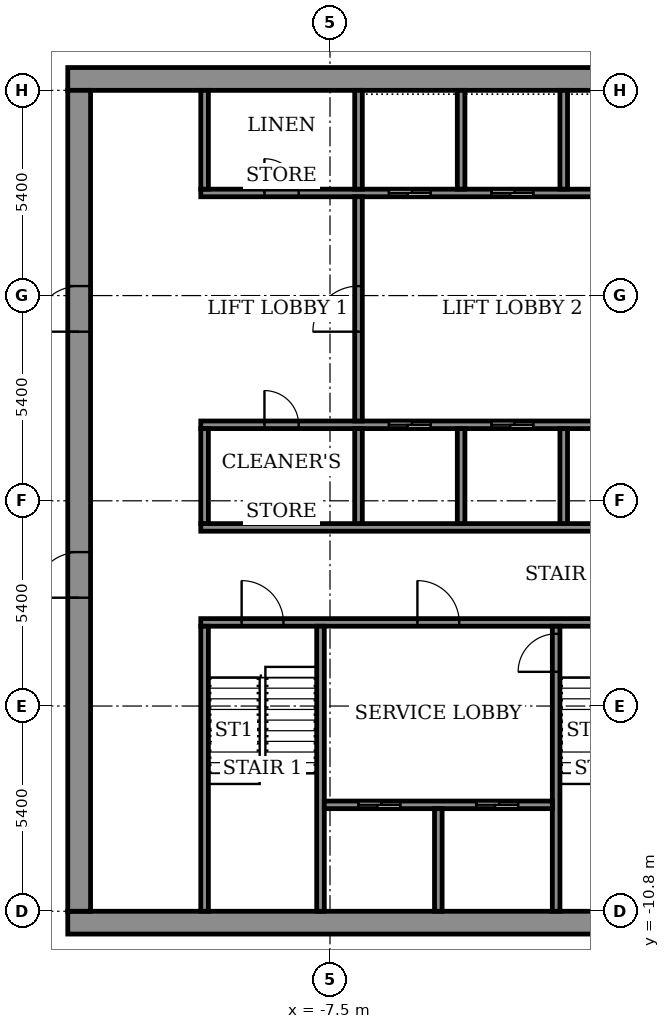
"""IFC4 building model, lengths in metres.
Left out: names, types, materials, properties, quantities, classifications, styles, units other than length and angle.
Written with IfcOpenShell. Run it as: python <this file> out.ifc"""

import sys

from ifc_helpers import new_model, si_unit, direction, frame, frame_2d, origin, place, context, subcontext, project, spatial, rectangle, extrude, element, fill, save


model = new_model("IFC4")
c1 = context("Model", 3, precision=1e-05, world=origin(), true_north=direction((0.0, 1.0)))
c2 = subcontext(c1, "Body", "Model", "MODEL_VIEW")
j1 = project(units=[si_unit("LENGTHUNIT", "METRE"), si_unit("PLANEANGLEUNIT", "RADIAN")], contexts=[c1])
p1 = place(None, origin())
s1 = spatial("IfcSite", under=j1, at=p1, CompositionType="ELEMENT")
p2 = place(p1, origin())
s2 = spatial("IfcBuilding", under=s1, at=p2, CompositionType="ELEMENT")
p3 = place(p2, frame((0.0, 0.0, 306.1)))
s3 = spatial("IfcBuildingStorey", under=s2, at=p3, CompositionType="ELEMENT", Elevation=306.1)
for number, where, z_axis, x_axis in (
    (1, (-14.4, -11.1, 0.0), (0.0, 0.0, 1.0), (1.0, 0.0, 0.0)),
    (2, (-14.4, 11.1, 0.0), (0.0, 0.0, 1.0), (1.0, 0.0, 0.0)),
):
    element("IfcWall", number, at=place(p3, frame(where, z_axis=z_axis, x_axis=x_axis)), inside=s3, PredefinedType="SHEAR", context=c2, shape_type="SweptSolid", body=[
        extrude(rectangle(XDim=28.8, YDim=0.6, at=frame_2d((14.4, 0.0))), origin(), (0.0, 0.0, 1.0), 3.6),
    ])
p4 = place(p3, frame((-14.1, -10.8, 0.0), z_axis=(0.0, 0.0, 1.0), x_axis=(0.0, 1.0, 0.0)))
e3 = element("IfcWall", 3, at=p4, inside=s3, PredefinedType="SHEAR", context=c2, shape_type="SweptSolid", body=[
    extrude(rectangle(XDim=21.6, YDim=0.6, at=frame_2d((10.8, 0.0))), origin(), (0.0, 0.0, 1.0), 3.6),
])
p5 = place(p4, frame((8.25, 0.0, 0.0)))
e4 = element("IfcOpeningElement", 4, at=p5, cuts=e3, PredefinedType="OPENING", context=c2, shape_type="SweptSolid", body=[
    extrude(rectangle(XDim=1.2, YDim=2.1, at=frame_2d((0.6, 1.05))), frame((0.0, 0.31, 0.0), z_axis=(0.0, -1.0, 0.0), x_axis=(1.0, 0.0, 0.0)), (0.0, 0.0, 1.0), 0.62),
])
p6 = place(p4, frame((15.25, 0.0, 0.0)))
e5 = element("IfcOpeningElement", 5, at=p6, cuts=e3, PredefinedType="OPENING", context=c2, shape_type="SweptSolid", body=[
    extrude(rectangle(XDim=1.2, YDim=2.1, at=frame_2d((0.6, 1.05))), frame((0.0, 0.31, 0.0), z_axis=(0.0, -1.0, 0.0), x_axis=(1.0, 0.0, 0.0)), (0.0, 0.0, 1.0), 0.62),
])
p7 = place(p3, frame((-10.9, -3.2, 0.0), z_axis=(0.0, 0.0, 1.0), x_axis=(1.0, 0.0, 0.0)))
e6 = element("IfcWall", 6, at=p7, inside=s3, PredefinedType="SHEAR", context=c2, shape_type="SweptSolid", body=[
    extrude(rectangle(XDim=21.8, YDim=0.2, at=frame_2d((10.9, 0.0))), origin(), (0.0, 0.0, 1.0), 3.05),
])
p8 = place(p7, frame((1.075, 0.0, 0.0)))
e7 = element("IfcOpeningElement", 7, at=p8, cuts=e6, PredefinedType="OPENING", context=c2, shape_type="SweptSolid", body=[
    extrude(rectangle(XDim=1.1, YDim=2.1, at=frame_2d((0.55, 1.05))), frame((0.0, 0.11, 0.0), z_axis=(0.0, -1.0, 0.0), x_axis=(1.0, 0.0, 0.0)), (0.0, 0.0, 1.0), 0.22),
])
p9 = place(p7, frame((10.325, 0.0, 0.0)))
e8 = element("IfcOpeningElement", 8, at=p9, cuts=e6, PredefinedType="OPENING", context=c2, shape_type="SweptSolid", body=[
    extrude(rectangle(XDim=1.1, YDim=2.1, at=frame_2d((0.55, 1.05))), frame((0.0, 0.11, 0.0), z_axis=(0.0, -1.0, 0.0), x_axis=(1.0, 0.0, 0.0)), (0.0, 0.0, 1.0), 0.22),
])
p10 = place(p7, frame((19.625, 0.0, 0.0)))
e9 = element("IfcOpeningElement", 9, at=p10, cuts=e6, PredefinedType="OPENING", context=c2, shape_type="SweptSolid", body=[
    extrude(rectangle(XDim=1.1, YDim=2.1, at=frame_2d((0.55, 1.05))), frame((0.0, 0.11, 0.0), z_axis=(0.0, -1.0, 0.0), x_axis=(1.0, 0.0, 0.0)), (0.0, 0.0, 1.0), 0.22),
])
p11 = place(p7, frame((5.7, 0.0, 0.0)))
e10 = element("IfcOpeningElement", 10, at=p11, cuts=e6, PredefinedType="OPENING", context=c2, shape_type="SweptSolid", body=[
    extrude(rectangle(XDim=1.1, YDim=2.1, at=frame_2d((0.55, 1.05))), frame((0.0, 0.11, 0.0), z_axis=(0.0, -1.0, 0.0), x_axis=(1.0, 0.0, 0.0)), (0.0, 0.0, 1.0), 0.22),
])
p12 = place(p7, frame((14.975, 0.0, 0.0)))
e11 = element("IfcOpeningElement", 11, at=p12, cuts=e6, PredefinedType="OPENING", context=c2, shape_type="SweptSolid", body=[
    extrude(rectangle(XDim=1.1, YDim=2.1, at=frame_2d((0.55, 1.05))), frame((0.0, 0.11, 0.0), z_axis=(0.0, -1.0, 0.0), x_axis=(1.0, 0.0, 0.0)), (0.0, 0.0, 1.0), 0.22),
])
p13 = place(p3, frame((-10.9, -0.7, 0.0), z_axis=(0.0, 0.0, 1.0), x_axis=(1.0, 0.0, 0.0)))
e12 = element("IfcWall", 12, at=p13, inside=s3, PredefinedType="SHEAR", context=c2, shape_type="SweptSolid", body=[
    extrude(rectangle(XDim=21.8, YDim=0.2, at=frame_2d((10.9, 0.0))), origin(), (0.0, 0.0, 1.0), 3.05),
])
p14 = place(p3, frame((-10.9, 2.0, 0.0), z_axis=(0.0, 0.0, 1.0), x_axis=(1.0, 0.0, 0.0)))
e13 = element("IfcWall", 13, at=p14, inside=s3, PredefinedType="SHEAR", context=c2, shape_type="SweptSolid", body=[
    extrude(rectangle(XDim=21.8, YDim=0.2, at=frame_2d((10.9, 0.0))), origin(), (0.0, 0.0, 1.0), 3.05),
])
p15 = place(p14, frame((4.95, 0.0, 0.0)))
e14 = element("IfcOpeningElement", 14, at=p15, cuts=e13, PredefinedType="OPENING", context=c2, shape_type="SweptSolid", body=[
    extrude(rectangle(XDim=1.1, YDim=2.1, at=frame_2d((0.55, 1.05))), frame((0.0, 0.11, 0.0), z_axis=(0.0, -1.0, 0.0), x_axis=(1.0, 0.0, 0.0)), (0.0, 0.0, 1.0), 0.22),
])
p16 = place(p14, frame((7.65, 0.0, 0.0)))
e15 = element("IfcOpeningElement", 15, at=p16, cuts=e13, PredefinedType="OPENING", context=c2, shape_type="SweptSolid", body=[
    extrude(rectangle(XDim=1.1, YDim=2.1, at=frame_2d((0.55, 1.05))), frame((0.0, 0.11, 0.0), z_axis=(0.0, -1.0, 0.0), x_axis=(1.0, 0.0, 0.0)), (0.0, 0.0, 1.0), 0.22),
])
p17 = place(p14, frame((10.35, 0.0, 0.0)))
e16 = element("IfcOpeningElement", 16, at=p17, cuts=e13, PredefinedType="OPENING", context=c2, shape_type="SweptSolid", body=[
    extrude(rectangle(XDim=1.1, YDim=2.1, at=frame_2d((0.55, 1.05))), frame((0.0, 0.11, 0.0), z_axis=(0.0, -1.0, 0.0), x_axis=(1.0, 0.0, 0.0)), (0.0, 0.0, 1.0), 0.22),
])
p18 = place(p14, frame((1.675, 0.0, 0.0)))
e17 = element("IfcOpeningElement", 17, at=p18, cuts=e13, PredefinedType="OPENING", context=c2, shape_type="SweptSolid", body=[
    extrude(rectangle(XDim=0.9, YDim=2.1, at=frame_2d((0.45, 1.05))), frame((0.0, 0.11, 0.0), z_axis=(0.0, -1.0, 0.0), x_axis=(1.0, 0.0, 0.0)), (0.0, 0.0, 1.0), 0.22),
])
p19 = place(p14, frame((14.5, 0.0, 0.0)))
e18 = element("IfcOpeningElement", 18, at=p19, cuts=e13, PredefinedType="OPENING", context=c2, shape_type="SweptSolid", body=[
    extrude(rectangle(XDim=0.9, YDim=2.1, at=frame_2d((0.45, 1.05))), frame((0.0, 0.11, 0.0), z_axis=(0.0, -1.0, 0.0), x_axis=(1.0, 0.0, 0.0)), (0.0, 0.0, 1.0), 0.22),
])
p20 = place(p14, frame((19.225, 0.0, 0.0)))
e19 = element("IfcOpeningElement", 19, at=p20, cuts=e13, PredefinedType="OPENING", context=c2, shape_type="SweptSolid", body=[
    extrude(rectangle(XDim=0.9, YDim=2.1, at=frame_2d((0.45, 1.05))), frame((0.0, 0.11, 0.0), z_axis=(0.0, -1.0, 0.0), x_axis=(1.0, 0.0, 0.0)), (0.0, 0.0, 1.0), 0.22),
])
p21 = place(p3, frame((-10.9, 8.1, 0.0), z_axis=(0.0, 0.0, 1.0), x_axis=(1.0, 0.0, 0.0)))
e20 = element("IfcWall", 20, at=p21, inside=s3, PredefinedType="SHEAR", context=c2, shape_type="SweptSolid", body=[
    extrude(rectangle(XDim=21.8, YDim=0.2, at=frame_2d((10.9, 0.0))), origin(), (0.0, 0.0, 1.0), 3.05),
])
p22 = place(p21, frame((4.95, 0.0, 0.0)))
e21 = element("IfcOpeningElement", 21, at=p22, cuts=e20, PredefinedType="OPENING", context=c2, shape_type="SweptSolid", body=[
    extrude(rectangle(XDim=1.1, YDim=2.1, at=frame_2d((0.55, 1.05))), frame((0.0, 0.11, 0.0), z_axis=(0.0, -1.0, 0.0), x_axis=(1.0, 0.0, 0.0)), (0.0, 0.0, 1.0), 0.22),
])
p23 = place(p21, frame((7.65, 0.0, 0.0)))
e22 = element("IfcOpeningElement", 22, at=p23, cuts=e20, PredefinedType="OPENING", context=c2, shape_type="SweptSolid", body=[
    extrude(rectangle(XDim=1.1, YDim=2.1, at=frame_2d((0.55, 1.05))), frame((0.0, 0.11, 0.0), z_axis=(0.0, -1.0, 0.0), x_axis=(1.0, 0.0, 0.0)), (0.0, 0.0, 1.0), 0.22),
])
p24 = place(p21, frame((10.35, 0.0, 0.0)))
e23 = element("IfcOpeningElement", 23, at=p24, cuts=e20, PredefinedType="OPENING", context=c2, shape_type="SweptSolid", body=[
    extrude(rectangle(XDim=1.1, YDim=2.1, at=frame_2d((0.55, 1.05))), frame((0.0, 0.11, 0.0), z_axis=(0.0, -1.0, 0.0), x_axis=(1.0, 0.0, 0.0)), (0.0, 0.0, 1.0), 0.22),
])
p25 = place(p21, frame((1.675, 0.0, 0.0)))
e24 = element("IfcOpeningElement", 24, at=p25, cuts=e20, PredefinedType="OPENING", context=c2, shape_type="SweptSolid", body=[
    extrude(rectangle(XDim=0.9, YDim=2.1, at=frame_2d((0.45, 1.05))), frame((0.0, 0.11, 0.0), z_axis=(0.0, -1.0, 0.0), x_axis=(1.0, 0.0, 0.0)), (0.0, 0.0, 1.0), 0.22),
])
p26 = place(p21, frame((14.5, 0.0, 0.0)))
e25 = element("IfcOpeningElement", 25, at=p26, cuts=e20, PredefinedType="OPENING", context=c2, shape_type="SweptSolid", body=[
    extrude(rectangle(XDim=0.9, YDim=2.1, at=frame_2d((0.45, 1.05))), frame((0.0, 0.11, 0.0), z_axis=(0.0, -1.0, 0.0), x_axis=(1.0, 0.0, 0.0)), (0.0, 0.0, 1.0), 0.22),
])
p27 = place(p21, frame((19.225, 0.0, 0.0)))
e26 = element("IfcOpeningElement", 26, at=p27, cuts=e20, PredefinedType="OPENING", context=c2, shape_type="SweptSolid", body=[
    extrude(rectangle(XDim=0.9, YDim=2.1, at=frame_2d((0.45, 1.05))), frame((0.0, 0.11, 0.0), z_axis=(0.0, -1.0, 0.0), x_axis=(1.0, 0.0, 0.0)), (0.0, 0.0, 1.0), 0.22),
])
for number, where, z_axis, x_axis in (
    (27, (-10.8, -10.8, 0.0), (0.0, 0.0, 1.0), (0.0, 1.0, 0.0)),
    (28, (-7.75, -10.8, 0.0), (0.0, 0.0, 1.0), (0.0, 1.0, 0.0)),
):
    element("IfcWall", number, at=place(p3, frame(where, z_axis=z_axis, x_axis=x_axis)), inside=s3, PredefinedType="SHEAR", context=c2, shape_type="SweptSolid", body=[
        extrude(rectangle(XDim=7.5, YDim=0.2, at=frame_2d((3.75, 0.0))), origin(), (0.0, 0.0, 1.0), 3.05),
    ])
p28 = place(p3, frame((-1.55, -10.8, 0.0), z_axis=(0.0, 0.0, 1.0), x_axis=(0.0, 1.0, 0.0)))
e29 = element("IfcWall", 29, at=p28, inside=s3, PredefinedType="SHEAR", context=c2, shape_type="SweptSolid", body=[
    extrude(rectangle(XDim=7.5, YDim=0.2, at=frame_2d((3.75, 0.0))), origin(), (0.0, 0.0, 1.0), 3.05),
])
p29 = place(p28, frame((6.3, 0.0, 0.0)))
e30 = element("IfcOpeningElement", 30, at=p29, cuts=e29, PredefinedType="OPENING", context=c2, shape_type="SweptSolid", body=[
    extrude(rectangle(XDim=1.0, YDim=2.1, at=frame_2d((0.5, 1.05))), frame((0.0, 0.11, 0.0), z_axis=(0.0, -1.0, 0.0), x_axis=(1.0, 0.0, 0.0)), (0.0, 0.0, 1.0), 0.22),
])
p30 = place(p3, frame((-7.65, -8.0, 0.0), z_axis=(0.0, 0.0, 1.0), x_axis=(1.0, 0.0, 0.0)))
e31 = element("IfcWall", 31, at=p30, inside=s3, PredefinedType="SHEAR", context=c2, shape_type="SweptSolid", body=[
    extrude(rectangle(XDim=6.0, YDim=0.2, at=frame_2d((3.0, 0.0))), origin(), (0.0, 0.0, 1.0), 3.05),
])
p31 = place(p30, frame((0.9, 0.0, 0.0)))
e32 = element("IfcOpeningElement", 32, at=p31, cuts=e31, PredefinedType="OPENING", context=c2, shape_type="SweptSolid", body=[
    extrude(rectangle(XDim=1.1, YDim=2.1, at=frame_2d((0.55, 1.05))), frame((0.0, 0.11, 0.0), z_axis=(0.0, -1.0, 0.0), x_axis=(1.0, 0.0, 0.0)), (0.0, 0.0, 1.0), 0.22),
])
p32 = place(p30, frame((4.0, 0.0, 0.0)))
e33 = element("IfcOpeningElement", 33, at=p32, cuts=e31, PredefinedType="OPENING", context=c2, shape_type="SweptSolid", body=[
    extrude(rectangle(XDim=1.1, YDim=2.1, at=frame_2d((0.55, 1.05))), frame((0.0, 0.11, 0.0), z_axis=(0.0, -1.0, 0.0), x_axis=(1.0, 0.0, 0.0)), (0.0, 0.0, 1.0), 0.22),
])
p33 = place(p3, frame((-4.65, -10.8, 0.0), z_axis=(0.0, 0.0, 1.0), x_axis=(0.0, 1.0, 0.0)))
e34 = element("IfcWall", 34, at=p33, inside=s3, PredefinedType="SHEAR", context=c2, shape_type="SweptSolid", body=[
    extrude(rectangle(XDim=2.7, YDim=0.2, at=frame_2d((1.35, 0.0))), origin(), (0.0, 0.0, 1.0), 3.05),
])
p34 = place(p3, frame((-10.8, -0.6, 0.0), z_axis=(0.0, 0.0, 1.0), x_axis=(0.0, 1.0, 0.0)))
e35 = element("IfcWall", 35, at=p34, inside=s3, PredefinedType="STANDARD", context=c2, shape_type="SweptSolid", body=[
    extrude(rectangle(XDim=2.5, YDim=0.2, at=frame_2d((1.25, 0.0))), origin(), (0.0, 0.0, 1.0), 3.05),
])
for number, where, z_axis, x_axis in (
    (36, (-6.75, -0.6, 0.0), (0.0, 0.0, 1.0), (0.0, 1.0, 0.0)),
    (37, (-4.05, -0.6, 0.0), (0.0, 0.0, 1.0), (0.0, 1.0, 0.0)),
    (38, (-1.35, -0.6, 0.0), (0.0, 0.0, 1.0), (0.0, 1.0, 0.0)),
):
    element("IfcWall", number, at=place(p3, frame(where, z_axis=z_axis, x_axis=x_axis)), inside=s3, PredefinedType="SHEAR", context=c2, shape_type="SweptSolid", body=[
        extrude(rectangle(XDim=2.5, YDim=0.2, at=frame_2d((1.25, 0.0))), origin(), (0.0, 0.0, 1.0), 3.05),
    ])
p35 = place(p3, frame((-10.8, 8.2, 0.0), z_axis=(0.0, 0.0, 1.0), x_axis=(0.0, 1.0, 0.0)))
e39 = element("IfcWall", 39, at=p35, inside=s3, PredefinedType="STANDARD", context=c2, shape_type="SweptSolid", body=[
    extrude(rectangle(XDim=2.6, YDim=0.2, at=frame_2d((1.3, 0.0))), origin(), (0.0, 0.0, 1.0), 3.05),
])
for number, where, z_axis, x_axis in (
    (40, (-6.75, 8.2, 0.0), (0.0, 0.0, 1.0), (0.0, 1.0, 0.0)),
    (41, (-4.05, 8.2, 0.0), (0.0, 0.0, 1.0), (0.0, 1.0, 0.0)),
    (42, (-1.35, 8.2, 0.0), (0.0, 0.0, 1.0), (0.0, 1.0, 0.0)),
):
    element("IfcWall", number, at=place(p3, frame(where, z_axis=z_axis, x_axis=x_axis)), inside=s3, PredefinedType="SHEAR", context=c2, shape_type="SweptSolid", body=[
        extrude(rectangle(XDim=2.6, YDim=0.2, at=frame_2d((1.3, 0.0))), origin(), (0.0, 0.0, 1.0), 3.05),
    ])
p36 = place(p3, frame((-6.75, 2.1, 0.0), z_axis=(0.0, 0.0, 1.0), x_axis=(0.0, 1.0, 0.0)))
e43 = element("IfcWall", 43, at=p36, inside=s3, PredefinedType="STANDARD", context=c2, shape_type="SweptSolid", body=[
    extrude(rectangle(XDim=5.9, YDim=0.2, at=frame_2d((2.95, 0.0))), origin(), (0.0, 0.0, 1.0), 3.05),
])
p37 = place(p36, frame((2.35, 0.0, 0.0)))
e44 = element("IfcOpeningElement", 44, at=p37, cuts=e43, PredefinedType="OPENING", context=c2, shape_type="SweptSolid", body=[
    extrude(rectangle(XDim=1.2, YDim=2.1, at=frame_2d((0.6, 1.05))), frame((0.0, 0.11, 0.0), z_axis=(0.0, -1.0, 0.0), x_axis=(1.0, 0.0, 0.0)), (0.0, 0.0, 1.0), 0.22),
])
p38 = place(p5, origin())
e45 = element("IfcDoor", 45, at=p38, inside=s3, OperationType="DOUBLE_DOOR_SINGLE_SWING", PredefinedType="DOOR", context=c2, shape_type="SweptSolid", body=[
    extrude(rectangle(XDim=1.2, YDim=2.1, at=frame_2d((0.6, 1.05))), frame((0.0, 0.025, 0.0), z_axis=(0.0, -1.0, 0.0), x_axis=(1.0, 0.0, 0.0)), (0.0, 0.0, 1.0), 0.05),
])
fill(e4, e45)
p39 = place(p6, origin())
e46 = element("IfcDoor", 46, at=p39, inside=s3, OperationType="DOUBLE_DOOR_SINGLE_SWING", PredefinedType="DOOR", context=c2, shape_type="SweptSolid", body=[
    extrude(rectangle(XDim=1.2, YDim=2.1, at=frame_2d((0.6, 1.05))), frame((0.0, 0.025, 0.0), z_axis=(0.0, -1.0, 0.0), x_axis=(1.0, 0.0, 0.0)), (0.0, 0.0, 1.0), 0.05),
])
fill(e5, e46)
p40 = place(p15, origin())
e47 = element("IfcDoor", 47, at=p40, inside=s3, OperationType="SLIDING_TO_LEFT", PredefinedType="DOOR", context=c2, shape_type="SweptSolid", body=[
    extrude(rectangle(XDim=1.1, YDim=2.1, at=frame_2d((0.55, 1.05))), frame((0.0, 0.025, 0.0), z_axis=(0.0, -1.0, 0.0), x_axis=(1.0, 0.0, 0.0)), (0.0, 0.0, 1.0), 0.05),
])
fill(e14, e47)
p41 = place(p16, origin())
e48 = element("IfcDoor", 48, at=p41, inside=s3, OperationType="SLIDING_TO_LEFT", PredefinedType="DOOR", context=c2, shape_type="SweptSolid", body=[
    extrude(rectangle(XDim=1.1, YDim=2.1, at=frame_2d((0.55, 1.05))), frame((0.0, 0.025, 0.0), z_axis=(0.0, -1.0, 0.0), x_axis=(1.0, 0.0, 0.0)), (0.0, 0.0, 1.0), 0.05),
])
fill(e15, e48)
p42 = place(p22, origin())
e49 = element("IfcDoor", 49, at=p42, inside=s3, OperationType="SLIDING_TO_LEFT", PredefinedType="DOOR", context=c2, shape_type="SweptSolid", body=[
    extrude(rectangle(XDim=1.1, YDim=2.1, at=frame_2d((0.55, 1.05))), frame((0.0, 0.025, 0.0), z_axis=(0.0, -1.0, 0.0), x_axis=(1.0, 0.0, 0.0)), (0.0, 0.0, 1.0), 0.05),
])
fill(e21, e49)
p43 = place(p23, origin())
e50 = element("IfcDoor", 50, at=p43, inside=s3, OperationType="SLIDING_TO_LEFT", PredefinedType="DOOR", context=c2, shape_type="SweptSolid", body=[
    extrude(rectangle(XDim=1.1, YDim=2.1, at=frame_2d((0.55, 1.05))), frame((0.0, 0.025, 0.0), z_axis=(0.0, -1.0, 0.0), x_axis=(1.0, 0.0, 0.0)), (0.0, 0.0, 1.0), 0.05),
])
fill(e22, e50)
p44 = place(p18, origin())
e51 = element("IfcDoor", 51, at=p44, inside=s3, OperationType="SINGLE_SWING_RIGHT", PredefinedType="DOOR", context=c2, shape_type="SweptSolid", body=[
    extrude(rectangle(XDim=0.9, YDim=2.1, at=frame_2d((0.45, 1.05))), frame((0.0, 0.025, 0.0), z_axis=(0.0, -1.0, 0.0), x_axis=(1.0, 0.0, 0.0)), (0.0, 0.0, 1.0), 0.05),
])
fill(e17, e51)
p45 = place(p25, origin())
e52 = element("IfcDoor", 52, at=p45, inside=s3, OperationType="SINGLE_SWING_RIGHT", PredefinedType="DOOR", context=c2, shape_type="SweptSolid", body=[
    extrude(rectangle(XDim=0.9, YDim=2.1, at=frame_2d((0.45, 1.05))), frame((0.0, 0.025, 0.0), z_axis=(0.0, -1.0, 0.0), x_axis=(1.0, 0.0, 0.0)), (0.0, 0.0, 1.0), 0.05),
])
fill(e24, e52)
p46 = place(p31, origin())
e53 = element("IfcDoor", 53, at=p46, inside=s3, OperationType="SLIDING_TO_LEFT", PredefinedType="DOOR", context=c2, shape_type="SweptSolid", body=[
    extrude(rectangle(XDim=1.1, YDim=2.1, at=frame_2d((0.55, 1.05))), frame((0.0, 0.025, 0.0), z_axis=(0.0, -1.0, 0.0), x_axis=(1.0, 0.0, 0.0)), (0.0, 0.0, 1.0), 0.05),
])
fill(e32, e53)
p47 = place(p32, origin())
e54 = element("IfcDoor", 54, at=p47, inside=s3, OperationType="SLIDING_TO_LEFT", PredefinedType="DOOR", context=c2, shape_type="SweptSolid", body=[
    extrude(rectangle(XDim=1.1, YDim=2.1, at=frame_2d((0.55, 1.05))), frame((0.0, 0.025, 0.0), z_axis=(0.0, -1.0, 0.0), x_axis=(1.0, 0.0, 0.0)), (0.0, 0.0, 1.0), 0.05),
])
fill(e33, e54)
p48 = place(p8, origin())
e55 = element("IfcDoor", 55, at=p48, inside=s3, OperationType="SINGLE_SWING_RIGHT", PredefinedType="DOOR", context=c2, shape_type="SweptSolid", body=[
    extrude(rectangle(XDim=1.1, YDim=2.1, at=frame_2d((0.55, 1.05))), frame((0.0, 0.025, 0.0), z_axis=(0.0, -1.0, 0.0), x_axis=(1.0, 0.0, 0.0)), (0.0, 0.0, 1.0), 0.05),
])
fill(e7, e55)
p49 = place(p11, origin())
e56 = element("IfcDoor", 56, at=p49, inside=s3, OperationType="SINGLE_SWING_LEFT", PredefinedType="DOOR", context=c2, shape_type="SweptSolid", body=[
    extrude(rectangle(XDim=1.1, YDim=2.1, at=frame_2d((0.55, 1.05))), frame((0.0, 0.025, 0.0), z_axis=(0.0, -1.0, 0.0), x_axis=(1.0, 0.0, 0.0)), (0.0, 0.0, 1.0), 0.05),
])
fill(e10, e56)
p50 = place(p29, origin())
e57 = element("IfcDoor", 57, at=p50, inside=s3, OperationType="SINGLE_SWING_RIGHT", PredefinedType="DOOR", context=c2, shape_type="SweptSolid", body=[
    extrude(rectangle(XDim=1.0, YDim=2.1, at=frame_2d((0.5, 1.05))), frame((0.0, 0.025, 0.0), z_axis=(0.0, -1.0, 0.0), x_axis=(1.0, 0.0, 0.0)), (0.0, 0.0, 1.0), 0.05),
])
fill(e30, e57)
p51 = place(p37, origin())
e58 = element("IfcDoor", 58, at=p51, inside=s3, OperationType="SINGLE_SWING_LEFT", PredefinedType="DOOR", context=c2, shape_type="SweptSolid", body=[
    extrude(rectangle(XDim=1.2, YDim=2.1, at=frame_2d((0.6, 1.05))), frame((0.0, 0.025, 0.0), z_axis=(0.0, -1.0, 0.0), x_axis=(1.0, 0.0, 0.0)), (0.0, 0.0, 1.0), 0.05),
])
fill(e44, e58)
save(model, sys.argv[1])
